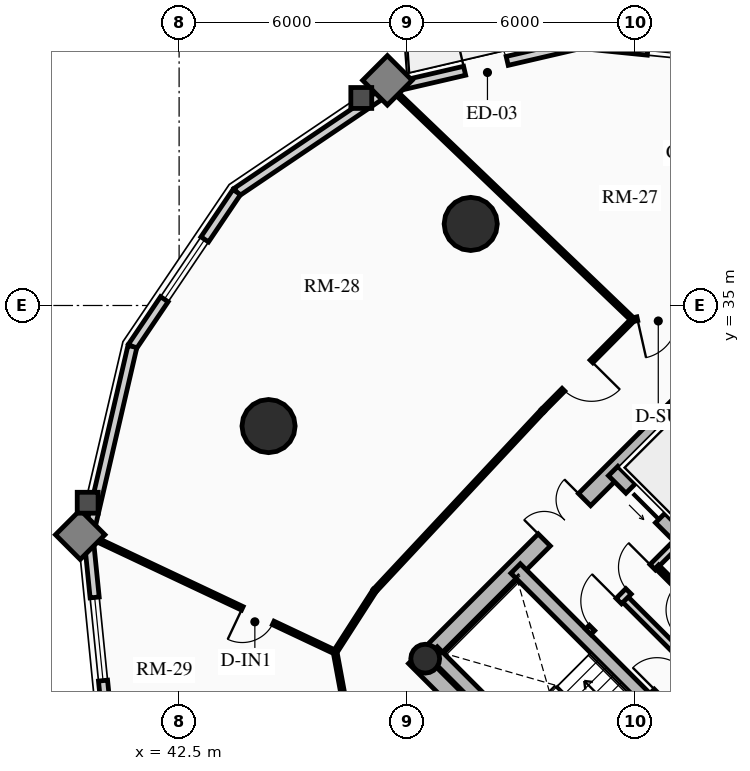
"""IFC4 building model, lengths in metres.
Left out: names, types, materials, properties, quantities, classifications, styles, units other than length and angle.
Written with IfcOpenShell. Run it as: python <this file> out.ifc"""

import sys

from ifc_helpers import new_model, si_unit, direction, frame, frame_2d, origin, origin_2d, place, context, subcontext, project, spatial, rectangle, circle, hollow_circle, extrude, source, transform, mapped, element, fill, save


model = new_model("IFC4")
c1 = context("Model", 3, precision=1e-05, world=origin(), true_north=direction((0.0, 1.0)))
c2 = subcontext(c1, "Body", "Model", "MODEL_VIEW")
j1 = project(units=[si_unit("LENGTHUNIT", "METRE"), si_unit("PLANEANGLEUNIT", "RADIAN")], contexts=[c1])
p1 = place(None, origin())
s1 = spatial("IfcSite", under=j1, at=p1, CompositionType="ELEMENT")
p2 = place(p1, origin())
s2 = spatial("IfcBuilding", under=s1, at=p2, CompositionType="ELEMENT")
p3 = place(p2, frame((0.0, 0.0, 102.16)))
s3 = spatial("IfcBuildingStorey", under=s2, at=p3, CompositionType="ELEMENT", Elevation=102.16)
p4 = place(p3, frame((58.737, 15.697, 0.0), z_axis=(0.0, 0.0, 1.0), x_axis=(-0.707106781187, 0.707106781187, 0.0)))
e1 = element("IfcWall", 1, at=p4, inside=s3, PredefinedType="SHEAR", context=c2, shape_type="SweptSolid", body=[
    extrude(rectangle(XDim=14.2, YDim=0.45, at=frame_2d((7.1, 0.0))), origin(), (0.0, 0.0, 1.0), 2.91),
])
p5 = place(p3, frame((48.856, 25.578, 0.0), z_axis=(0.0, 0.0, 1.0), x_axis=(0.707106781187, 0.707106781187, 0.0)))
e2 = element("IfcWall", 2, at=p5, inside=s3, PredefinedType="SHEAR", context=c2, shape_type="SweptSolid", body=[
    extrude(rectangle(XDim=10.7, YDim=0.45, at=frame_2d((5.35, 0.0))), origin(), (0.0, 0.0, 1.0), 2.91),
])
m1 = source(origin(), c2, "Body", "SweptSolid", [
    extrude(rectangle(XDim=1.5, YDim=2.02, at=frame_2d((0.75, 1.01))), frame((0.0, 0.235, 0.0), z_axis=(0.0, -1.0, 0.0), x_axis=(1.0, 0.0, 0.0)), (0.0, 0.0, 1.0), 0.47),
])
p6 = place(p5, frame((4.6, 0.0, 0.0)))
e3 = element("IfcOpeningElement", 3, at=p6, cuts=e2, PredefinedType="OPENING", context=c2, shape_type="MappedRepresentation", body=[
    mapped(m1, transform((0.0, 0.0, 0.0), x_axis=(1.0, 0.0, 0.0), y_axis=(0.0, 1.0, 0.0), z_axis=(0.0, 0.0, 1.0), scale=1.0)),
])
p7 = place(p3, frame((61.078, 18.355, 0.0), z_axis=(0.0, 0.0, 1.0), x_axis=(-0.707106781187, 0.707106781187, 0.0)))
e4 = element("IfcWall", 4, at=p7, inside=s3, PredefinedType="SHEAR", context=c2, shape_type="SweptSolid", body=[
    extrude(rectangle(XDim=13.75, YDim=0.35, at=frame_2d((6.875, 0.0))), origin(), (0.0, 0.0, 1.0), 2.91),
])
m2 = source(origin(), c2, "Body", "SweptSolid", [
    extrude(rectangle(XDim=1.1, YDim=2.015, at=frame_2d((0.55, 1.007))), frame((0.0, 0.185, 0.0), z_axis=(0.0, -1.0, 0.0), x_axis=(1.0, 0.0, 0.0)), (0.0, 0.0, 1.0), 0.37),
])
p8 = place(p7, frame((4.875, 0.0, 0.0)))
e5 = element("IfcOpeningElement", 5, at=p8, cuts=e4, PredefinedType="OPENING", context=c2, shape_type="MappedRepresentation", body=[
    mapped(m2, transform((0.0, 0.0, 0.0), x_axis=(1.0, 0.0, 0.0), y_axis=(0.0, 1.0, 0.0), z_axis=(0.0, 0.0, 1.0), scale=1.0)),
])
m3 = source(origin(), c2, "Body", "SweptSolid", [
    extrude(rectangle(XDim=1.15, YDim=2.02, at=frame_2d((0.575, 1.01))), frame((0.0, 0.185, 0.0), z_axis=(0.0, -1.0, 0.0), x_axis=(1.0, 0.0, 0.0)), (0.0, 0.0, 1.0), 0.37),
])
p9 = place(p7, frame((7.295, 0.0, 0.0)))
e6 = element("IfcOpeningElement", 6, at=p9, cuts=e4, PredefinedType="OPENING", context=c2, shape_type="MappedRepresentation", body=[
    mapped(m3, transform((0.0, 0.0, 0.0), x_axis=(1.0, 0.0, 0.0), y_axis=(0.0, 1.0, 0.0), z_axis=(0.0, 0.0, 1.0), scale=1.0)),
])
p10 = place(p3, frame((63.645, 20.922, 0.0), z_axis=(0.0, 0.0, 1.0), x_axis=(-0.707106781187, 0.707106781187, 0.0)))
e7 = element("IfcWall", 7, at=p10, inside=s3, PredefinedType="SHEAR", context=c2, shape_type="SweptSolid", body=[
    extrude(rectangle(XDim=13.75, YDim=0.35, at=frame_2d((6.875, 0.0))), origin(), (0.0, 0.0, 1.0), 2.91),
])
p11 = place(p10, frame((10.0, 0.0, 0.0)))
e8 = element("IfcOpeningElement", 8, at=p11, cuts=e7, PredefinedType="OPENING", context=c2, shape_type="MappedRepresentation", body=[
    mapped(m2, transform((0.0, 0.0, 0.0), x_axis=(1.0, 0.0, 0.0), y_axis=(0.0, 1.0, 0.0), z_axis=(0.0, 0.0, 1.0), scale=1.0)),
])
p12 = place(p10, frame((12.0, 0.0, 0.0)))
e9 = element("IfcOpeningElement", 9, at=p12, cuts=e7, PredefinedType="OPENING", context=c2, shape_type="MappedRepresentation", body=[
    mapped(m2, transform((0.0, 0.0, 0.0), x_axis=(1.0, 0.0, 0.0), y_axis=(0.0, 1.0, 0.0), z_axis=(0.0, 0.0, 1.0), scale=1.0)),
])
p13 = place(p10, frame((5.305, 0.0, 0.0)))
e10 = element("IfcOpeningElement", 10, at=p13, cuts=e7, PredefinedType="OPENING", context=c2, shape_type="MappedRepresentation", body=[
    mapped(m3, transform((0.0, 0.0, 0.0), x_axis=(1.0, 0.0, 0.0), y_axis=(0.0, 1.0, 0.0), z_axis=(0.0, 0.0, 1.0), scale=1.0)),
])
p14 = place(p3, frame((53.922, 21.141, 0.0), z_axis=(0.0, 0.0, 1.0), x_axis=(-0.707088616009, 0.707124945897, 0.0)))
e11 = element("IfcWall", 11, at=p14, inside=s3, PredefinedType="SHEAR", context=c2, shape_type="SweptSolid", body=[
    extrude(rectangle(XDim=6.72, YDim=0.35, at=frame_2d((3.36, 0.0))), origin(), (0.0, 0.0, 1.0), 2.91),
])
p15 = place(p3, frame((48.976, 25.706, 0.0), z_axis=(0.0, 0.0, 1.0), x_axis=(0.707106781187, 0.707106781187, 0.0)))
e12 = element("IfcColumn", 12, at=p15, inside=s3, PredefinedType="COLUMN", context=c2, shape_type="SweptSolid", body=[
    extrude(hollow_circle(Radius=0.38, WallThickness=0.032, at=origin_2d()), origin(), (0.0, 0.0, 1.0), 2.91),
])
for number, where, z_axis, x_axis in (
    (13, (50.173, 37.146, 0.0), (0.0, 0.0, 1.0), (1.0, 0.0, 0.0)),
    (14, (44.854, 31.827, 0.0), (0.0, 0.0, 1.0), (1.0, 0.0, 0.0)),
):
    element("IfcColumn", number, at=place(p3, frame(where, z_axis=z_axis, x_axis=x_axis)), inside=s3, PredefinedType="USERDEFINED", context=c2, shape_type="SweptSolid", body=[
        extrude(circle(Radius=0.7, at=origin_2d()), origin(), (0.0, 0.0, 1.0), 2.91),
    ])
p16 = place(p3, frame((53.067, 41.885, 0.0), z_axis=(0.0, 0.0, 1.0), x_axis=(0.994971754311, -0.10015591906, 0.0)))
e15 = element("IfcWall", 15, at=p16, inside=s3, PredefinedType="SOLIDWALL", context=c2, shape_type="SweptSolid", body=[
    extrude(rectangle(XDim=5.448, YDim=0.24, at=frame_2d((2.724, 0.0))), origin(), (0.0, 0.0, 1.0), 2.179),
])
m4 = source(origin(), c2, "Body", "SweptSolid", [
    extrude(rectangle(XDim=1.9, YDim=1.35, at=frame_2d((0.95, 0.675))), frame((0.0, 0.13, 0.0), z_axis=(0.0, -1.0, 0.0), x_axis=(1.0, 0.0, 0.0)), (0.0, 0.0, 1.0), 0.26),
])
p17 = place(p16, frame((1.774, 0.0, 0.65)))
e16 = element("IfcOpeningElement", 16, at=p17, cuts=e15, PredefinedType="OPENING", context=c2, shape_type="MappedRepresentation", body=[
    mapped(m4, transform((0.0, 0.0, 0.0), x_axis=(1.0, 0.0, 0.0), y_axis=(0.0, 1.0, 0.0), z_axis=(0.0, 0.0, 1.0), scale=1.0)),
])
p18 = place(p3, frame((48.08, 40.729, 0.0), z_axis=(0.0, 0.0, 1.0), x_axis=(0.974165631126, 0.225834725257, 0.0)))
e17 = element("IfcWall", 17, at=p18, inside=s3, PredefinedType="SOLIDWALL", context=c2, shape_type="SweptSolid", body=[
    extrude(rectangle(XDim=5.119, YDim=0.24, at=frame_2d((2.56, 0.0))), origin(), (0.0, 0.0, 1.0), 2.179),
])
m5 = source(origin(), c2, "Body", "SweptSolid", [
    extrude(rectangle(XDim=1.15, YDim=2.005, at=frame_2d((0.575, 1.002))), frame((0.0, 0.13, 0.0), z_axis=(0.0, -1.0, 0.0), x_axis=(1.0, 0.0, 0.0)), (0.0, 0.0, 1.0), 0.26),
])
p19 = place(p18, frame((1.984, 0.0, 0.0)))
e18 = element("IfcOpeningElement", 18, at=p19, cuts=e17, PredefinedType="OPENING", context=c2, shape_type="MappedRepresentation", body=[
    mapped(m5, transform((0.0, 0.0, 0.0), x_axis=(1.0, 0.0, 0.0), y_axis=(0.0, 1.0, 0.0), z_axis=(0.0, 0.0, 1.0), scale=1.0)),
])
p20 = place(p3, frame((44.015, 37.985, 0.0), z_axis=(0.0, 0.0, 1.0), x_axis=(0.828781148131, 0.559572880421, 0.0)))
e19 = element("IfcWall", 19, at=p20, inside=s3, PredefinedType="SOLIDWALL", context=c2, shape_type="SweptSolid", body=[
    extrude(rectangle(XDim=4.905, YDim=0.24, at=frame_2d((2.452, 0.0))), origin(), (0.0, 0.0, 1.0), 2.179),
])
p21 = place(p3, frame((41.271, 33.92, 0.0), z_axis=(0.0, 0.0, 1.0), x_axis=(0.559572880421, 0.828781148131, 0.0)))
e20 = element("IfcWall", 20, at=p21, inside=s3, PredefinedType="SOLIDWALL", context=c2, shape_type="SweptSolid", body=[
    extrude(rectangle(XDim=4.905, YDim=0.24, at=frame_2d((2.452, 0.0))), origin(), (0.0, 0.0, 1.0), 2.179),
])
p22 = place(p21, frame((1.502, 0.0, 0.65)))
e21 = element("IfcOpeningElement", 21, at=p22, cuts=e20, PredefinedType="OPENING", context=c2, shape_type="MappedRepresentation", body=[
    mapped(m4, transform((0.0, 0.0, 0.0), x_axis=(1.0, 0.0, 0.0), y_axis=(0.0, 1.0, 0.0), z_axis=(0.0, 0.0, 1.0), scale=1.0)),
])
p23 = place(p3, frame((40.115, 28.933, 0.0), z_axis=(0.0, 0.0, 1.0), x_axis=(0.225834725257, 0.974165631126, 0.0)))
e22 = element("IfcWall", 22, at=p23, inside=s3, PredefinedType="SOLIDWALL", context=c2, shape_type="SweptSolid", body=[
    extrude(rectangle(XDim=5.119, YDim=0.24, at=frame_2d((2.56, 0.0))), origin(), (0.0, 0.0, 1.0), 2.179),
])
p24 = place(p3, frame((40.661, 23.513, 0.0), z_axis=(0.0, 0.0, 1.0), x_axis=(-0.10015591906, 0.994971754311, 0.0)))
e23 = element("IfcWall", 23, at=p24, inside=s3, PredefinedType="SOLIDWALL", context=c2, shape_type="SweptSolid", body=[
    extrude(rectangle(XDim=5.448, YDim=0.24, at=frame_2d((2.724, 0.0))), origin(), (0.0, 0.0, 1.0), 2.179),
])
m6 = source(origin(), c2, "Body", "SweptSolid", [
    extrude(rectangle(XDim=2.2, YDim=1.35, at=frame_2d((1.1, 0.675))), frame((0.0, 0.13, 0.0), z_axis=(0.0, -1.0, 0.0), x_axis=(1.0, 0.0, 0.0)), (0.0, 0.0, 1.0), 0.26),
])
p25 = place(p24, frame((1.624, 0.0, 0.65)))
e24 = element("IfcOpeningElement", 24, at=p25, cuts=e23, PredefinedType="OPENING", context=c2, shape_type="MappedRepresentation", body=[
    mapped(m6, transform((0.0, 0.0, 0.0), x_axis=(1.0, 0.0, 0.0), y_axis=(0.0, 1.0, 0.0), z_axis=(0.0, 0.0, 1.0), scale=1.0)),
])
p26 = place(p3, frame((54.961, 24.719, 0.0), z_axis=(0.0, 0.0, 1.0), x_axis=(0.707106781187, 0.707106781187, 0.0)))
e25 = element("IfcWall", 25, at=p26, inside=s3, PredefinedType="PARTITIONING", context=c2, shape_type="SweptSolid", body=[
    extrude(rectangle(XDim=3.28, YDim=0.2, at=frame_2d((1.64, 0.0))), origin(), (0.0, 0.0, 1.0), 2.655),
])
m7 = source(origin(), c2, "Body", "SweptSolid", [
    extrude(rectangle(XDim=0.9, YDim=2.005, at=frame_2d((0.45, 1.002))), frame((0.0, 0.11, 0.0), z_axis=(0.0, -1.0, 0.0), x_axis=(1.0, 0.0, 0.0)), (0.0, 0.0, 1.0), 0.22),
])
p27 = place(p26, frame((0.16, 0.0, 0.0)))
e26 = element("IfcOpeningElement", 26, at=p27, cuts=e25, PredefinedType="OPENING", context=c2, shape_type="MappedRepresentation", body=[
    mapped(m7, transform((0.0, 0.0, 0.0), x_axis=(1.0, 0.0, 0.0), y_axis=(0.0, 1.0, 0.0), z_axis=(0.0, 0.0, 1.0), scale=1.0)),
])
p28 = place(p3, frame((55.874, 25.631, 0.0), z_axis=(0.0, 0.0, 1.0), x_axis=(-0.707157639372, 0.707055919343, 0.0)))
e27 = element("IfcWall", 27, at=p28, inside=s3, PredefinedType="PARTITIONING", context=c2, shape_type="SweptSolid", body=[
    extrude(rectangle(XDim=2.4, YDim=0.2, at=frame_2d((1.2, 0.0))), origin(), (0.0, 0.0, 1.0), 2.655),
])
p29 = place(p3, frame((53.264, 26.416, 0.0), z_axis=(0.0, 0.0, 1.0), x_axis=(0.707106781187, 0.707106781187, 0.0)))
e28 = element("IfcWall", 28, at=p29, inside=s3, PredefinedType="PARTITIONING", context=c2, shape_type="SweptSolid", body=[
    extrude(rectangle(XDim=3.28, YDim=0.2, at=frame_2d((1.64, 0.0))), origin(), (0.0, 0.0, 1.0), 2.655),
])
m8 = source(origin(), c2, "Body", "SweptSolid", [
    extrude(rectangle(XDim=1.0, YDim=2.015, at=frame_2d((0.5, 1.007))), frame((0.0, 0.11, 0.0), z_axis=(0.0, -1.0, 0.0), x_axis=(1.0, 0.0, 0.0)), (0.0, 0.0, 1.0), 0.22),
])
p30 = place(p29, frame((0.14, 0.0, 0.0)))
e29 = element("IfcOpeningElement", 29, at=p30, cuts=e28, PredefinedType="OPENING", context=c2, shape_type="MappedRepresentation", body=[
    mapped(m8, transform((0.0, 0.0, 0.0), x_axis=(1.0, 0.0, 0.0), y_axis=(0.0, 1.0, 0.0), z_axis=(0.0, 0.0, 1.0), scale=1.0)),
])
p31 = place(p29, frame((1.5, 0.0, 0.0)))
e30 = element("IfcOpeningElement", 30, at=p31, cuts=e28, PredefinedType="OPENING", context=c2, shape_type="MappedRepresentation", body=[
    mapped(m7, transform((0.0, 0.0, 0.0), x_axis=(1.0, 0.0, 0.0), y_axis=(0.0, 1.0, 0.0), z_axis=(0.0, 0.0, 1.0), scale=1.0)),
])
p32 = place(p3, frame((56.673, 26.529, 0.0), z_axis=(0.0, 0.0, 1.0), x_axis=(-0.707052764397, 0.70716079385, 0.0)))
e31 = element("IfcWall", 31, at=p32, inside=s3, PredefinedType="PARTITIONING", context=c2, shape_type="SweptSolid", body=[
    extrude(rectangle(XDim=2.26, YDim=0.125, at=frame_2d((1.13, 0.0))), origin(), (0.0, 0.0, 1.0), 2.655),
])
m9 = source(origin(), c2, "Body", "SweptSolid", [
    extrude(rectangle(XDim=0.9, YDim=2.005, at=frame_2d((0.45, 1.002))), frame((0.0, 0.073, 0.0), z_axis=(0.0, -1.0, 0.0), x_axis=(1.0, 0.0, 0.0)), (0.0, 0.0, 1.0), 0.145),
])
p33 = place(p32, frame((0.65, 0.0, 0.0)))
e32 = element("IfcOpeningElement", 32, at=p33, cuts=e31, PredefinedType="OPENING", context=c2, shape_type="MappedRepresentation", body=[
    mapped(m9, transform((0.0, 0.0, 0.0), x_axis=(1.0, 0.0, 0.0), y_axis=(0.0, 1.0, 0.0), z_axis=(0.0, 0.0, 1.0), scale=1.0)),
])
p34 = place(p3, frame((55.988, 34.974, 0.0), z_axis=(0.0, 0.0, 1.0), x_axis=(-0.975666565154, -0.219259557695, 0.0)))
e33 = element("IfcWall", 33, at=p34, inside=s3, PredefinedType="MOVABLE", context=c2, shape_type="SweptSolid", body=[
    extrude(rectangle(XDim=1.587, YDim=0.1, at=frame_2d((0.793, 0.0))), origin(), (0.0, 0.0, 1.0), 2.225),
])
m10 = source(origin(), c2, "Body", "SweptSolid", [
    extrude(rectangle(XDim=1.05, YDim=2.015, at=frame_2d((0.525, 1.007))), frame((0.0, 0.06, 0.0), z_axis=(0.0, -1.0, 0.0), x_axis=(1.0, 0.0, 0.0)), (0.0, 0.0, 1.0), 0.12),
])
p35 = place(p34, frame((0.417, 0.0, 0.0)))
e34 = element("IfcOpeningElement", 34, at=p35, cuts=e33, PredefinedType="OPENING", context=c2, shape_type="MappedRepresentation", body=[
    mapped(m10, transform((0.0, 0.0, 0.0), x_axis=(1.0, 0.0, 0.0), y_axis=(0.0, 1.0, 0.0), z_axis=(0.0, 0.0, 1.0), scale=1.0)),
])
p36 = place(p3, frame((54.44, 34.626, 0.0), z_axis=(0.0, 0.0, 1.0), x_axis=(-0.703978840546, -0.710220945948, 0.0)))
e35 = element("IfcWall", 35, at=p36, inside=s3, PredefinedType="MOVABLE", context=c2, shape_type="SweptSolid", body=[
    extrude(rectangle(XDim=3.364, YDim=0.1, at=frame_2d((1.682, 0.0))), origin(), (0.0, 0.0, 1.0), 2.225),
])
p37 = place(p36, frame((1.546, 0.0, 0.0)))
e36 = element("IfcOpeningElement", 36, at=p37, cuts=e35, PredefinedType="OPENING", context=c2, shape_type="MappedRepresentation", body=[
    mapped(m10, transform((0.0, 0.0, 0.0), x_axis=(1.0, 0.0, 0.0), y_axis=(0.0, 1.0, 0.0), z_axis=(0.0, 0.0, 1.0), scale=1.0)),
])
p38 = place(p3, frame((52.072, 32.237, 0.0), z_axis=(0.0, 0.0, 1.0), x_axis=(-0.682528774423, -0.730858722383, 0.0)))
e37 = element("IfcWall", 37, at=p38, inside=s3, PredefinedType="MOVABLE", context=c2, shape_type="SweptSolid", body=[
    extrude(rectangle(XDim=6.486, YDim=0.1, at=frame_2d((3.243, 0.0))), origin(), (0.0, 0.0, 1.0), 2.225),
])
p39 = place(p3, frame((47.645, 27.497, 0.0), z_axis=(0.0, 0.0, 1.0), x_axis=(-0.540680612097, -0.841227957038, 0.0)))
e38 = element("IfcWall", 38, at=p39, inside=s3, PredefinedType="MOVABLE", context=c2, shape_type="SweptSolid", body=[
    extrude(rectangle(XDim=1.924, YDim=0.1, at=frame_2d((0.962, 0.0))), origin(), (0.0, 0.0, 1.0), 2.225),
])
p40 = place(p3, frame((46.605, 25.879, 0.0), z_axis=(0.0, 0.0, 1.0), x_axis=(0.182019785456, -0.983294868136, 0.0)))
e39 = element("IfcWall", 39, at=p40, inside=s3, PredefinedType="MOVABLE", context=c2, shape_type="SweptSolid", body=[
    extrude(rectangle(XDim=1.384, YDim=0.1, at=frame_2d((0.692, 0.0))), origin(), (0.0, 0.0, 1.0), 2.225),
])
p41 = place(p3, frame((54.44, 34.626, 0.0), z_axis=(0.0, 0.0, 1.0), x_axis=(-0.722045979822, 0.691845071547, 0.0)))
e40 = element("IfcWall", 40, at=p41, inside=s3, PredefinedType="MOVABLE", context=c2, shape_type="SweptSolid", body=[
    extrude(rectangle(XDim=8.795, YDim=0.1, at=frame_2d((4.397, 0.0))), origin(), (0.0, 0.0, 1.0), 2.179),
])
p42 = place(p3, frame((46.605, 25.879, 0.0), z_axis=(0.0, 0.0, 1.0), x_axis=(-0.904450971726, 0.426577589359, 0.0)))
e41 = element("IfcWall", 41, at=p42, inside=s3, PredefinedType="MOVABLE", context=c2, shape_type="SweptSolid", body=[
    extrude(rectangle(XDim=7.154, YDim=0.1, at=frame_2d((3.577, 0.0))), origin(), (0.0, 0.0, 1.0), 2.179),
])
m11 = source(origin(), c2, "Body", "SweptSolid", [
    extrude(rectangle(XDim=0.9, YDim=2.005, at=frame_2d((0.45, 1.002))), frame((0.0, 0.06, 0.0), z_axis=(0.0, -1.0, 0.0), x_axis=(1.0, 0.0, 0.0)), (0.0, 0.0, 1.0), 0.12),
])
p43 = place(p42, frame((1.8, 0.0, 0.0)))
e42 = element("IfcOpeningElement", 42, at=p43, cuts=e41, PredefinedType="OPENING", context=c2, shape_type="MappedRepresentation", body=[
    mapped(m11, transform((0.0, 0.0, 0.0), x_axis=(1.0, 0.0, 0.0), y_axis=(0.0, 1.0, 0.0), z_axis=(0.0, 0.0, 1.0), scale=1.0)),
])
m12 = source(origin(), c2, "Body", "SweptSolid", [
    extrude(rectangle(XDim=1.9, YDim=1.35, at=frame_2d((0.95, 0.675))), frame((0.0, 0.03, 0.0), z_axis=(0.0, -1.0, 0.0), x_axis=(1.0, 0.0, 0.0)), (0.0, 0.0, 1.0), 0.06),
])
p44 = place(p17, origin())
e43 = element("IfcWindow", 43, at=p44, inside=s3, PartitioningType="DOUBLE_PANEL_VERTICAL", PredefinedType="WINDOW", context=c2, shape_type="MappedRepresentation", body=[
    mapped(m12, transform((0.0, 0.0, 0.0), x_axis=(1.0, 0.0, 0.0), y_axis=(0.0, 1.0, 0.0), z_axis=(0.0, 0.0, 1.0), scale=1.0)),
])
fill(e16, e43)
m13 = source(origin(), c2, "Body", "SweptSolid", [
    extrude(rectangle(XDim=1.15, YDim=2.005, at=frame_2d((0.575, 1.002))), frame((0.0, 0.025, 0.0), z_axis=(0.0, -1.0, 0.0), x_axis=(1.0, 0.0, 0.0)), (0.0, 0.0, 1.0), 0.05),
])
p45 = place(p19, origin())
e44 = element("IfcDoor", 44, at=p45, inside=s3, OperationType="SINGLE_SWING_LEFT", PredefinedType="DOOR", context=c2, shape_type="MappedRepresentation", body=[
    mapped(m13, transform((0.0, 0.0, 0.0), x_axis=(1.0, 0.0, 0.0), y_axis=(0.0, 1.0, 0.0), z_axis=(0.0, 0.0, 1.0), scale=1.0)),
])
fill(e18, e44)
p46 = place(p22, origin())
e45 = element("IfcWindow", 45, at=p46, inside=s3, PartitioningType="DOUBLE_PANEL_VERTICAL", PredefinedType="WINDOW", context=c2, shape_type="MappedRepresentation", body=[
    mapped(m12, transform((0.0, 0.0, 0.0), x_axis=(1.0, 0.0, 0.0), y_axis=(0.0, 1.0, 0.0), z_axis=(0.0, 0.0, 1.0), scale=1.0)),
])
fill(e21, e45)
m14 = source(origin(), c2, "Body", "SweptSolid", [
    extrude(rectangle(XDim=2.2, YDim=1.35, at=frame_2d((1.1, 0.675))), frame((0.0, 0.03, 0.0), z_axis=(0.0, -1.0, 0.0), x_axis=(1.0, 0.0, 0.0)), (0.0, 0.0, 1.0), 0.06),
])
p47 = place(p25, origin())
e46 = element("IfcWindow", 46, at=p47, inside=s3, PartitioningType="DOUBLE_PANEL_VERTICAL", PredefinedType="WINDOW", context=c2, shape_type="MappedRepresentation", body=[
    mapped(m14, transform((0.0, 0.0, 0.0), x_axis=(1.0, 0.0, 0.0), y_axis=(0.0, 1.0, 0.0), z_axis=(0.0, 0.0, 1.0), scale=1.0)),
])
fill(e24, e46)
m15 = source(origin(), c2, "Body", "SweptSolid", [
    extrude(rectangle(XDim=1.1, YDim=2.015, at=frame_2d((0.55, 1.007))), frame((0.0, 0.025, 0.0), z_axis=(0.0, -1.0, 0.0), x_axis=(1.0, 0.0, 0.0)), (0.0, 0.0, 1.0), 0.05),
])
p48 = place(p12, origin())
e47 = element("IfcDoor", 47, at=p48, inside=s3, OperationType="SLIDING_TO_LEFT", PredefinedType="DOOR", context=c2, shape_type="MappedRepresentation", body=[
    mapped(m15, transform((0.0, 0.0, 0.0), x_axis=(1.0, 0.0, 0.0), y_axis=(0.0, 1.0, 0.0), z_axis=(0.0, 0.0, 1.0), scale=1.0)),
])
fill(e9, e47)
m16 = source(origin(), c2, "Body", "SweptSolid", [
    extrude(rectangle(XDim=1.5, YDim=2.02, at=frame_2d((0.75, 1.01))), frame((0.0, 0.025, 0.0), z_axis=(0.0, -1.0, 0.0), x_axis=(1.0, 0.0, 0.0)), (0.0, 0.0, 1.0), 0.05),
])
p49 = place(p6, origin())
e48 = element("IfcDoor", 48, at=p49, inside=s3, OperationType="DOUBLE_DOOR_SINGLE_SWING", PredefinedType="DOOR", context=c2, shape_type="MappedRepresentation", body=[
    mapped(m16, transform((0.0, 0.0, 0.0), x_axis=(1.0, 0.0, 0.0), y_axis=(0.0, 1.0, 0.0), z_axis=(0.0, 0.0, 1.0), scale=1.0)),
])
fill(e3, e48)
m17 = source(origin(), c2, "Body", "SweptSolid", [
    extrude(rectangle(XDim=0.9, YDim=2.005, at=frame_2d((0.45, 1.002))), frame((0.0, 0.025, 0.0), z_axis=(0.0, -1.0, 0.0), x_axis=(1.0, 0.0, 0.0)), (0.0, 0.0, 1.0), 0.05),
])
p50 = place(p27, origin())
e49 = element("IfcDoor", 49, at=p50, inside=s3, OperationType="SINGLE_SWING_LEFT", PredefinedType="DOOR", context=c2, shape_type="MappedRepresentation", body=[
    mapped(m17, transform((0.0, 0.0, 0.0), x_axis=(1.0, 0.0, 0.0), y_axis=(0.0, 1.0, 0.0), z_axis=(0.0, 0.0, 1.0), scale=1.0)),
])
fill(e26, e49)
m18 = source(origin(), c2, "Body", "SweptSolid", [
    extrude(rectangle(XDim=1.0, YDim=2.015, at=frame_2d((0.5, 1.007))), frame((0.0, 0.025, 0.0), z_axis=(0.0, -1.0, 0.0), x_axis=(1.0, 0.0, 0.0)), (0.0, 0.0, 1.0), 0.05),
])
p51 = place(p30, origin())
e50 = element("IfcDoor", 50, at=p51, inside=s3, OperationType="SINGLE_SWING_RIGHT", PredefinedType="DOOR", context=c2, shape_type="MappedRepresentation", body=[
    mapped(m18, transform((0.0, 0.0, 0.0), x_axis=(1.0, 0.0, 0.0), y_axis=(0.0, 1.0, 0.0), z_axis=(0.0, 0.0, 1.0), scale=1.0)),
])
fill(e29, e50)
p52 = place(p31, origin())
e51 = element("IfcDoor", 51, at=p52, inside=s3, OperationType="SINGLE_SWING_RIGHT", PredefinedType="DOOR", context=c2, shape_type="MappedRepresentation", body=[
    mapped(m17, transform((0.0, 0.0, 0.0), x_axis=(1.0, 0.0, 0.0), y_axis=(0.0, 1.0, 0.0), z_axis=(0.0, 0.0, 1.0), scale=1.0)),
])
fill(e30, e51)
m19 = source(origin(), c2, "Body", "SweptSolid", [
    extrude(rectangle(XDim=1.05, YDim=2.015, at=frame_2d((0.525, 1.007))), frame((0.0, 0.025, 0.0), z_axis=(0.0, -1.0, 0.0), x_axis=(1.0, 0.0, 0.0)), (0.0, 0.0, 1.0), 0.05),
])
p53 = place(p35, origin())
e52 = element("IfcDoor", 52, at=p53, inside=s3, OperationType="SINGLE_SWING_RIGHT", PredefinedType="DOOR", context=c2, shape_type="MappedRepresentation", body=[
    mapped(m19, transform((0.0, 0.0, 0.0), x_axis=(1.0, 0.0, 0.0), y_axis=(0.0, 1.0, 0.0), z_axis=(0.0, 0.0, 1.0), scale=1.0)),
])
fill(e34, e52)
p54 = place(p37, origin())
e53 = element("IfcDoor", 53, at=p54, inside=s3, OperationType="SINGLE_SWING_LEFT", PredefinedType="DOOR", context=c2, shape_type="MappedRepresentation", body=[
    mapped(m19, transform((0.0, 0.0, 0.0), x_axis=(1.0, 0.0, 0.0), y_axis=(0.0, 1.0, 0.0), z_axis=(0.0, 0.0, 1.0), scale=1.0)),
])
fill(e36, e53)
p55 = place(p43, origin())
e54 = element("IfcDoor", 54, at=p55, inside=s3, OperationType="SINGLE_SWING_RIGHT", PredefinedType="DOOR", context=c2, shape_type="MappedRepresentation", body=[
    mapped(m17, transform((0.0, 0.0, 0.0), x_axis=(1.0, 0.0, 0.0), y_axis=(0.0, 1.0, 0.0), z_axis=(0.0, 0.0, 1.0), scale=1.0)),
])
fill(e42, e54)
save(model, sys.argv[1])
